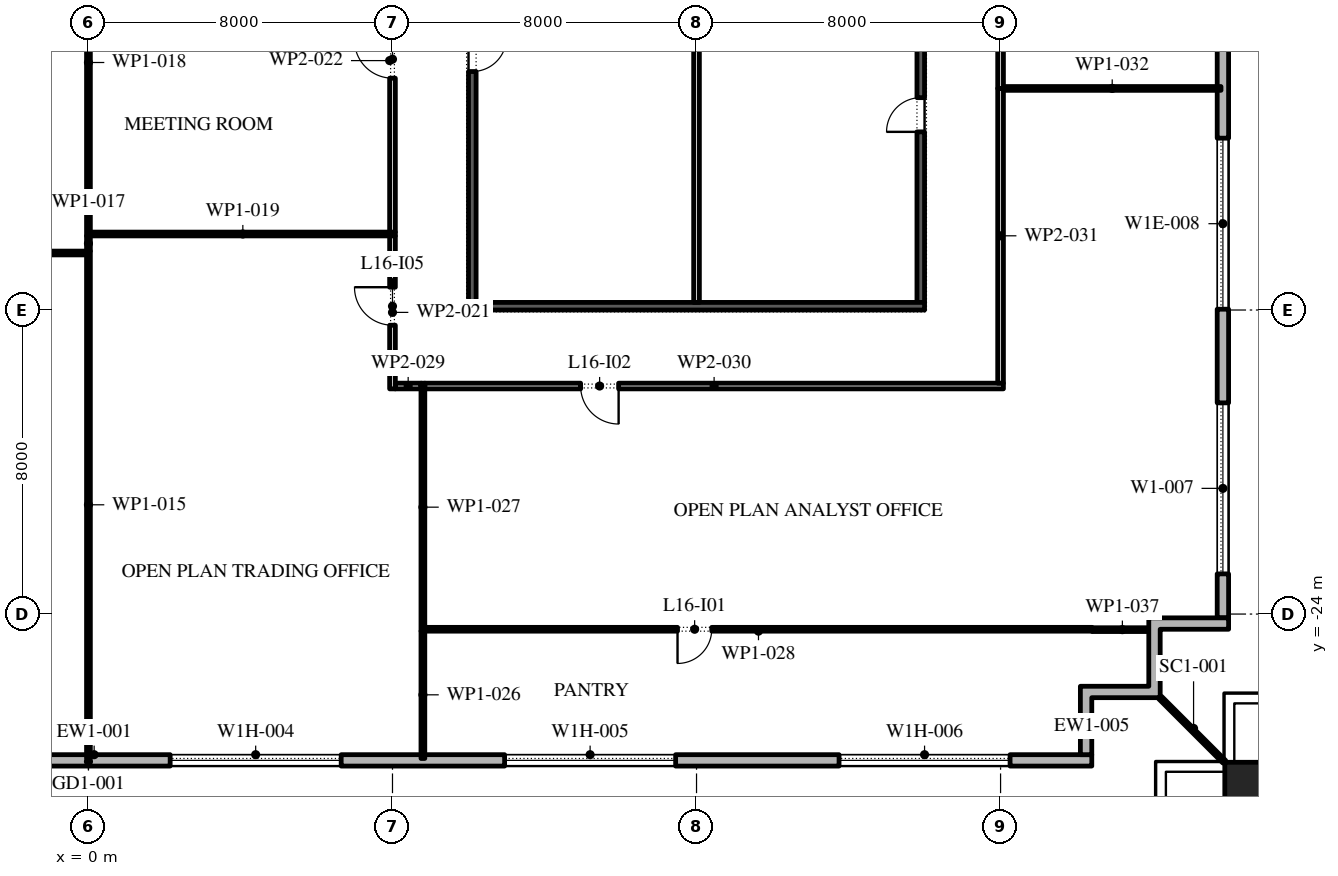
"""IFC4 building model, lengths in metres.
Left out: names, types, materials, properties, quantities, classifications, styles, units other than length and angle.
Written with IfcOpenShell. Run it as: python <this file> out.ifc"""

import sys

from ifc_helpers import new_model, si_unit, direction, frame, frame_2d, origin, origin_2d, place, context, subcontext, project, spatial, polyline, rectangle, outline, extrude, element, fill, save


model = new_model("IFC4")
c1 = context("Model", 3, precision=1e-05, world=origin(), true_north=direction((0.0, 1.0)))
c2 = subcontext(c1, "Body", "Model", "MODEL_VIEW")
j1 = project(units=[si_unit("LENGTHUNIT", "METRE"), si_unit("PLANEANGLEUNIT", "RADIAN")], contexts=[c1])
p1 = place(None, origin())
s1 = spatial("IfcSite", under=j1, at=p1, CompositionType="ELEMENT")
p2 = place(p1, origin())
s2 = spatial("IfcBuilding", under=s1, at=p2, CompositionType="ELEMENT")
p3 = place(p2, frame((0.0, 0.0, 77.4)))
s3 = spatial("IfcBuildingStorey", under=s2, at=p3, CompositionType="ELEMENT", Elevation=77.4)
p4 = place(p3, frame((30.6, -28.6, 0.0), z_axis=(0.0, 0.0, 1.0), x_axis=(1.0, 0.0, 0.0)))
e1 = element("IfcColumn", 1, at=p4, inside=s3, PredefinedType="COLUMN", context=c2, shape_type="SweptSolid", body=[
    extrude(rectangle(XDim=1.4, YDim=1.4, at=origin_2d()), origin(), (0.0, 0.0, 1.0), 4.2),
])
p5 = place(p3, frame((-26.1, -27.85, 0.0), z_axis=(0.0, 0.0, 1.0), x_axis=(1.0, 0.0, 0.0)))
e2 = element("IfcWall", 2, at=p5, inside=s3, PredefinedType="STANDARD", context=c2, shape_type="SweptSolid", body=[
    extrude(rectangle(XDim=52.5, YDim=0.3, at=frame_2d((26.25, 0.0))), origin(), (0.0, 0.0, 1.0), 4.0),
])
p6 = place(p5, frame((2.0, 0.0, 0.45)))
e3 = element("IfcOpeningElement", 3, at=p6, cuts=e2, PredefinedType="OPENING", context=c2, shape_type="SweptSolid", body=[
    extrude(rectangle(XDim=4.5, YDim=2.75, at=frame_2d((2.25, 1.375))), frame((0.0, 0.16, 0.0), z_axis=(0.0, -1.0, 0.0), x_axis=(1.0, 0.0, 0.0)), (0.0, 0.0, 1.0), 0.32),
])
p7 = place(p5, frame((10.65, 0.0, 0.45)))
e4 = element("IfcOpeningElement", 4, at=p7, cuts=e2, PredefinedType="OPENING", context=c2, shape_type="SweptSolid", body=[
    extrude(rectangle(XDim=4.5, YDim=2.75, at=frame_2d((2.25, 1.375))), frame((0.0, 0.16, 0.0), z_axis=(0.0, -1.0, 0.0), x_axis=(1.0, 0.0, 0.0)), (0.0, 0.0, 1.0), 0.32),
])
p8 = place(p5, frame((20.5, 0.0, 0.0)))
e5 = element("IfcOpeningElement", 5, at=p8, cuts=e2, PredefinedType="OPENING", context=c2, shape_type="SweptSolid", body=[
    extrude(rectangle(XDim=2.4, YDim=3.5, at=frame_2d((1.2, 1.75))), frame((0.0, 0.16, 0.0), z_axis=(0.0, -1.0, 0.0), x_axis=(1.0, 0.0, 0.0)), (0.0, 0.0, 1.0), 0.32),
])
p9 = place(p5, frame((28.25, 0.0, 0.45)))
e6 = element("IfcOpeningElement", 6, at=p9, cuts=e2, PredefinedType="OPENING", context=c2, shape_type="SweptSolid", body=[
    extrude(rectangle(XDim=4.5, YDim=2.75, at=frame_2d((2.25, 1.375))), frame((0.0, 0.16, 0.0), z_axis=(0.0, -1.0, 0.0), x_axis=(1.0, 0.0, 0.0)), (0.0, 0.0, 1.0), 0.32),
])
p10 = place(p5, frame((37.05, 0.0, 0.45)))
e7 = element("IfcOpeningElement", 7, at=p10, cuts=e2, PredefinedType="OPENING", context=c2, shape_type="SweptSolid", body=[
    extrude(rectangle(XDim=4.5, YDim=2.75, at=frame_2d((2.25, 1.375))), frame((0.0, 0.16, 0.0), z_axis=(0.0, -1.0, 0.0), x_axis=(1.0, 0.0, 0.0)), (0.0, 0.0, 1.0), 0.32),
])
p11 = place(p5, frame((45.85, 0.0, 0.45)))
e8 = element("IfcOpeningElement", 8, at=p11, cuts=e2, PredefinedType="OPENING", context=c2, shape_type="SweptSolid", body=[
    extrude(rectangle(XDim=4.5, YDim=2.75, at=frame_2d((2.25, 1.375))), frame((0.0, 0.16, 0.0), z_axis=(0.0, -1.0, 0.0), x_axis=(1.0, 0.0, 0.0)), (0.0, 0.0, 1.0), 0.32),
])
p12 = place(p3, frame((29.85, -24.1, 0.0), z_axis=(0.0, 0.0, 1.0), x_axis=(0.0, 1.0, 0.0)))
e9 = element("IfcWall", 9, at=p12, inside=s3, PredefinedType="STANDARD", context=c2, shape_type="SweptSolid", body=[
    extrude(rectangle(XDim=49.5, YDim=0.3, at=frame_2d((24.75, 0.0))), origin(), (0.0, 0.0, 1.0), 4.0),
])
p13 = place(p12, frame((1.157, 0.0, 0.45)))
e10 = element("IfcOpeningElement", 10, at=p13, cuts=e9, PredefinedType="OPENING", context=c2, shape_type="SweptSolid", body=[
    extrude(rectangle(XDim=4.5, YDim=3.05, at=frame_2d((2.25, 1.525))), frame((0.0, 0.16, 0.0), z_axis=(0.0, -1.0, 0.0), x_axis=(1.0, 0.0, 0.0)), (0.0, 0.0, 1.0), 0.32),
])
p14 = place(p12, frame((8.121, 0.0, 0.45)))
e11 = element("IfcOpeningElement", 11, at=p14, cuts=e9, PredefinedType="OPENING", context=c2, shape_type="SweptSolid", body=[
    extrude(rectangle(XDim=4.5, YDim=2.825, at=frame_2d((2.25, 1.413))), frame((0.0, 0.16, 0.0), z_axis=(0.0, -1.0, 0.0), x_axis=(1.0, 0.0, 0.0)), (0.0, 0.0, 1.0), 0.32),
])
p15 = place(p12, frame((16.286, 0.0, 0.0)))
e12 = element("IfcOpeningElement", 12, at=p15, cuts=e9, PredefinedType="OPENING", context=c2, shape_type="SweptSolid", body=[
    extrude(rectangle(XDim=2.4, YDim=3.325, at=frame_2d((1.2, 1.663))), frame((0.0, 0.16, 0.0), z_axis=(0.0, -1.0, 0.0), x_axis=(1.0, 0.0, 0.0)), (0.0, 0.0, 1.0), 0.32),
])
p16 = place(p12, frame((22.35, 0.0, 0.45)))
e13 = element("IfcOpeningElement", 13, at=p16, cuts=e9, PredefinedType="OPENING", context=c2, shape_type="SweptSolid", body=[
    extrude(rectangle(XDim=4.5, YDim=2.875, at=frame_2d((2.25, 1.438))), frame((0.0, 0.16, 0.0), z_axis=(0.0, -1.0, 0.0), x_axis=(1.0, 0.0, 0.0)), (0.0, 0.0, 1.0), 0.32),
])
p17 = place(p12, frame((29.464, 0.0, 0.45)))
e14 = element("IfcOpeningElement", 14, at=p17, cuts=e9, PredefinedType="OPENING", context=c2, shape_type="SweptSolid", body=[
    extrude(rectangle(XDim=4.5, YDim=2.875, at=frame_2d((2.25, 1.438))), frame((0.0, 0.16, 0.0), z_axis=(0.0, -1.0, 0.0), x_axis=(1.0, 0.0, 0.0)), (0.0, 0.0, 1.0), 0.32),
])
p18 = place(p12, frame((36.579, 0.0, 0.45)))
e15 = element("IfcOpeningElement", 15, at=p18, cuts=e9, PredefinedType="OPENING", context=c2, shape_type="SweptSolid", body=[
    extrude(rectangle(XDim=4.5, YDim=3.05, at=frame_2d((2.25, 1.525))), frame((0.0, 0.16, 0.0), z_axis=(0.0, -1.0, 0.0), x_axis=(1.0, 0.0, 0.0)), (0.0, 0.0, 1.0), 0.32),
])
p19 = place(p12, frame((44.743, 0.0, 0.0)))
e16 = element("IfcOpeningElement", 16, at=p19, cuts=e9, PredefinedType="OPENING", context=c2, shape_type="SweptSolid", body=[
    extrude(rectangle(XDim=2.4, YDim=3.325, at=frame_2d((1.2, 1.663))), frame((0.0, 0.16, 0.0), z_axis=(0.0, -1.0, 0.0), x_axis=(1.0, 0.0, 0.0)), (0.0, 0.0, 1.0), 0.32),
])
p20 = place(p3, origin())
e17 = element("IfcWall", 17, at=p20, inside=s3, PredefinedType="STANDARD", context=c2, shape_type="SweptSolid", body=[
    extrude(outline(polyline([(27.9, -25.9), (27.9, -24.1), (30.0, -24.1), (30.0, -24.4), (28.2, -24.4), (28.2, -26.2), (26.4, -26.2), (26.4, -27.7), (26.1, -27.7), (26.1, -25.9), (27.9, -25.9)])), origin(), (0.0, 0.0, 1.0), 4.0),
])
p21 = place(p3, frame((28.2, -26.2, -0.05), z_axis=(0.0, 0.0, 1.0), x_axis=(0.707106781187, -0.707106781187, 0.0)))
e18 = element("IfcWall", 18, at=p21, inside=s3, PredefinedType="STANDARD", context=c2, shape_type="SweptSolid", body=[
    extrude(rectangle(XDim=2.385, YDim=0.1, at=frame_2d((1.192, 0.0))), origin(), (0.0, 0.0, 1.0), 4.05),
])
p22 = place(p3, frame((21.9, -15.8, 0.0), z_axis=(0.0, 0.0, 1.0), x_axis=(0.0, 1.0, 0.0)))
e19 = element("IfcWall", 19, at=p22, inside=s3, PredefinedType="SHEAR", context=c2, shape_type="SweptSolid", body=[
    extrude(rectangle(XDim=13.05, YDim=0.2, at=frame_2d((6.525, 0.0))), origin(), (0.0, 0.0, 1.0), 4.0),
])
p23 = place(p22, frame((4.488, 0.0, 0.0)))
e20 = element("IfcOpeningElement", 20, at=p23, cuts=e19, PredefinedType="OPENING", context=c2, shape_type="SweptSolid", body=[
    extrude(rectangle(XDim=0.9, YDim=2.1, at=frame_2d((0.45, 1.05))), frame((0.0, 0.11, 0.0), z_axis=(0.0, -1.0, 0.0), x_axis=(1.0, 0.0, 0.0)), (0.0, 0.0, 1.0), 0.22),
])
p24 = place(p22, frame((11.038, 0.0, 0.0)))
e21 = element("IfcOpeningElement", 21, at=p24, cuts=e19, PredefinedType="OPENING", context=c2, shape_type="SweptSolid", body=[
    extrude(rectangle(XDim=1.0, YDim=2.1, at=frame_2d((0.5, 1.05))), frame((0.0, 0.11, 0.0), z_axis=(0.0, -1.0, 0.0), x_axis=(1.0, 0.0, 0.0)), (0.0, 0.0, 1.0), 0.22),
])
p25 = place(p3, frame((10.1, -15.8, 0.0), z_axis=(0.0, 0.0, 1.0), x_axis=(0.0, 1.0, 0.0)))
e22 = element("IfcWall", 22, at=p25, inside=s3, PredefinedType="SHEAR", context=c2, shape_type="SweptSolid", body=[
    extrude(rectangle(XDim=13.05, YDim=0.2, at=frame_2d((6.525, 0.0))), origin(), (0.0, 0.0, 1.0), 4.0),
])
p26 = place(p25, frame((6.075, 0.0, 0.0)))
e23 = element("IfcOpeningElement", 23, at=p26, cuts=e22, PredefinedType="OPENING", context=c2, shape_type="SweptSolid", body=[
    extrude(rectangle(XDim=0.9, YDim=2.1, at=frame_2d((0.45, 1.05))), frame((0.0, 0.11, 0.0), z_axis=(0.0, -1.0, 0.0), x_axis=(1.0, 0.0, 0.0)), (0.0, 0.0, 1.0), 0.22),
])
p27 = place(p3, frame((10.0, -15.9, 0.0), z_axis=(0.0, 0.0, 1.0), x_axis=(1.0, 0.0, 0.0)))
e24 = element("IfcWall", 24, at=p27, inside=s3, PredefinedType="SHEAR", context=c2, shape_type="SweptSolid", body=[
    extrude(rectangle(XDim=12.0, YDim=0.2, at=frame_2d((6.0, 0.0))), origin(), (0.0, 0.0, 1.0), 4.0),
])
p28 = place(p3, frame((16.0, -15.8, 0.0), z_axis=(0.0, 0.0, 1.0), x_axis=(0.0, 1.0, 0.0)))
e25 = element("IfcWall", 25, at=p28, inside=s3, PredefinedType="PARTITIONING", context=c2, shape_type="SweptSolid", body=[
    extrude(rectangle(XDim=13.05, YDim=0.15, at=frame_2d((6.525, 0.0))), origin(), (0.0, 0.0, 1.0), 4.0),
])
p29 = place(p28, frame((11.087, 0.0, 0.0)))
e26 = element("IfcOpeningElement", 26, at=p29, cuts=e25, PredefinedType="OPENING", context=c2, shape_type="SweptSolid", body=[
    extrude(rectangle(XDim=0.9, YDim=2.1, at=frame_2d((0.45, 1.05))), frame((0.0, 0.085, 0.0), z_axis=(0.0, -1.0, 0.0), x_axis=(1.0, 0.0, 0.0)), (0.0, 0.0, 1.0), 0.17),
])
p30 = place(p3, frame((0.0, -27.8, 0.0), z_axis=(0.0, 0.0, 1.0), x_axis=(0.0, 1.0, 0.0)))
e27 = element("IfcWall", 27, at=p30, inside=s3, PredefinedType="PARTITIONING", context=c2, shape_type="SweptSolid", body=[
    extrude(rectangle(XDim=13.35, YDim=0.1, at=frame_2d((6.675, 0.0))), origin(), (0.0, 0.0, 1.0), 4.0),
])
p31 = place(p3, frame((-0.05, -14.5, 0.0), z_axis=(0.0, 0.0, 1.0), x_axis=(-1.0, 0.0, 0.0)))
e28 = element("IfcWall", 28, at=p31, inside=s3, PredefinedType="PARTITIONING", context=c2, shape_type="SweptSolid", body=[
    extrude(rectangle(XDim=7.875, YDim=0.1, at=frame_2d((3.938, 0.0))), origin(), (0.0, 0.0, 1.0), 4.0),
])
p32 = place(p3, frame((0.0, -14.45, 0.0), z_axis=(0.0, 0.0, 1.0), x_axis=(0.0, 1.0, 0.0)))
e29 = element("IfcWall", 29, at=p32, inside=s3, PredefinedType="PARTITIONING", context=c2, shape_type="SweptSolid", body=[
    extrude(rectangle(XDim=0.4, YDim=0.1, at=frame_2d((0.2, 0.0))), origin(), (0.0, 0.0, 1.0), 4.0),
])
p33 = place(p3, frame((0.0, -14.05, 0.0), z_axis=(0.0, 0.0, 1.0), x_axis=(0.0, 1.0, 0.0)))
e30 = element("IfcWall", 30, at=p33, inside=s3, PredefinedType="PARTITIONING", context=c2, shape_type="SweptSolid", body=[
    extrude(rectangle(XDim=9.125, YDim=0.1, at=frame_2d((4.562, 0.0))), origin(), (0.0, 0.0, 1.0), 4.0),
])
p34 = place(p3, frame((0.05, -14.0, 0.0), z_axis=(0.0, 0.0, 1.0), x_axis=(1.0, 0.0, 0.0)))
e31 = element("IfcWall", 31, at=p34, inside=s3, PredefinedType="PARTITIONING", context=c2, shape_type="SweptSolid", body=[
    extrude(rectangle(XDim=8.025, YDim=0.1, at=frame_2d((4.012, 0.0))), origin(), (0.0, 0.0, 1.0), 4.0),
])
p35 = place(p3, frame((8.0, -18.075, 0.0), z_axis=(0.0, 0.0, 1.0), x_axis=(0.0, 1.0, 0.0)))
e32 = element("IfcWall", 32, at=p35, inside=s3, PredefinedType="PARTITIONING", context=c2, shape_type="SweptSolid", body=[
    extrude(rectangle(XDim=4.025, YDim=0.15, at=frame_2d((2.012, 0.0))), origin(), (0.0, 0.0, 1.0), 4.0),
])
p36 = place(p35, frame((1.675, 0.0, 0.0)))
e33 = element("IfcOpeningElement", 33, at=p36, cuts=e32, PredefinedType="OPENING", context=c2, shape_type="SweptSolid", body=[
    extrude(rectangle(XDim=1.0, YDim=2.1, at=frame_2d((0.5, 1.05))), frame((0.0, 0.085, 0.0), z_axis=(0.0, -1.0, 0.0), x_axis=(1.0, 0.0, 0.0)), (0.0, 0.0, 1.0), 0.17),
])
p37 = place(p3, frame((8.0, -13.95, 0.0), z_axis=(0.0, 0.0, 1.0), x_axis=(0.0, 1.0, 0.0)))
e34 = element("IfcWall", 34, at=p37, inside=s3, PredefinedType="PARTITIONING", context=c2, shape_type="SweptSolid", body=[
    extrude(rectangle(XDim=9.025, YDim=0.15, at=frame_2d((4.512, 0.0))), origin(), (0.0, 0.0, 1.0), 4.0),
])
p38 = place(p37, frame((4.05, 0.0, 0.0)))
e35 = element("IfcOpeningElement", 35, at=p38, cuts=e34, PredefinedType="OPENING", context=c2, shape_type="SweptSolid", body=[
    extrude(rectangle(XDim=1.0, YDim=2.1, at=frame_2d((0.5, 1.05))), frame((0.0, 0.085, 0.0), z_axis=(0.0, -1.0, 0.0), x_axis=(1.0, 0.0, 0.0)), (0.0, 0.0, 1.0), 0.17),
])
p39 = place(p3, frame((8.8, -27.8, 0.0), z_axis=(0.0, 0.0, 1.0), x_axis=(0.0, 1.0, 0.0)))
e36 = element("IfcWall", 36, at=p39, inside=s3, PredefinedType="PARTITIONING", context=c2, shape_type="SweptSolid", body=[
    extrude(rectangle(XDim=3.35, YDim=0.1, at=frame_2d((1.675, 0.0))), origin(), (0.0, 0.0, 1.0), 4.0),
])
p40 = place(p3, frame((8.8, -24.45, 0.0), z_axis=(0.0, 0.0, 1.0), x_axis=(0.0, 1.0, 0.0)))
e37 = element("IfcWall", 37, at=p40, inside=s3, PredefinedType="PARTITIONING", context=c2, shape_type="SweptSolid", body=[
    extrude(rectangle(XDim=6.525, YDim=0.1, at=frame_2d((3.262, 0.0))), origin(), (0.0, 0.0, 1.0), 4.0),
])
p41 = place(p3, frame((8.85, -24.4, 0.0), z_axis=(0.0, 0.0, 1.0), x_axis=(1.0, 0.0, 0.0)))
e38 = element("IfcWall", 38, at=p41, inside=s3, PredefinedType="PARTITIONING", context=c2, shape_type="SweptSolid", body=[
    extrude(rectangle(XDim=17.56, YDim=0.1, at=frame_2d((8.78, 0.0))), origin(), (0.0, 0.0, 1.0), 4.0),
])
p42 = place(p41, frame((6.65, 0.0, 0.0)))
e39 = element("IfcOpeningElement", 39, at=p42, cuts=e38, PredefinedType="OPENING", context=c2, shape_type="SweptSolid", body=[
    extrude(rectangle(XDim=0.9, YDim=2.1, at=frame_2d((0.45, 1.05))), frame((0.0, 0.06, 0.0), z_axis=(0.0, -1.0, 0.0), x_axis=(1.0, 0.0, 0.0)), (0.0, 0.0, 1.0), 0.12),
])
p43 = place(p3, frame((8.75, -18.0, 0.0), z_axis=(0.0, 0.0, 1.0), x_axis=(-1.0, 0.0, 0.0)))
e40 = element("IfcWall", 40, at=p43, inside=s3, PredefinedType="PARTITIONING", context=c2, shape_type="SweptSolid", body=[
    extrude(rectangle(XDim=0.675, YDim=0.15, at=frame_2d((0.337, 0.0))), origin(), (0.0, 0.0, 1.0), 4.0),
])
p44 = place(p3, frame((24.075, -18.0, 0.0), z_axis=(0.0, 0.0, 1.0), x_axis=(-1.0, 0.0, 0.0)))
e41 = element("IfcWall", 41, at=p44, inside=s3, PredefinedType="PARTITIONING", context=c2, shape_type="SweptSolid", body=[
    extrude(rectangle(XDim=15.225, YDim=0.15, at=frame_2d((7.612, 0.0))), origin(), (0.0, 0.0, 1.0), 4.0),
])
p45 = place(p44, frame((10.125, 0.0, 0.0)))
e42 = element("IfcOpeningElement", 42, at=p45, cuts=e41, PredefinedType="OPENING", context=c2, shape_type="SweptSolid", body=[
    extrude(rectangle(XDim=1.0, YDim=2.1, at=frame_2d((0.5, 1.05))), frame((0.0, 0.085, 0.0), z_axis=(0.0, -1.0, 0.0), x_axis=(1.0, 0.0, 0.0)), (0.0, 0.0, 1.0), 0.17),
])
p46 = place(p3, frame((24.0, -10.17, 0.0), z_axis=(0.0, 0.0, 1.0), x_axis=(0.0, -1.0, 0.0)))
e43 = element("IfcWall", 43, at=p46, inside=s3, PredefinedType="PARTITIONING", context=c2, shape_type="SweptSolid", body=[
    extrude(rectangle(XDim=7.755, YDim=0.15, at=frame_2d((3.877, 0.0))), origin(), (0.0, 0.0, 1.0), 4.0),
])
p47 = place(p3, frame((24.075, -10.17, 0.0), z_axis=(0.0, 0.0, 1.0), x_axis=(1.0, 0.0, 0.0)))
e44 = element("IfcWall", 44, at=p47, inside=s3, PredefinedType="PARTITIONING", context=c2, shape_type="SweptSolid", body=[
    extrude(rectangle(XDim=5.725, YDim=0.1, at=frame_2d((2.863, 0.0))), origin(), (0.0, 0.0, 1.0), 4.0),
])
p48 = place(p3, frame((24.0, 11.22, 0.0), z_axis=(0.0, 0.0, 1.0), x_axis=(0.0, -1.0, 0.0)))
e45 = element("IfcWall", 45, at=p48, inside=s3, PredefinedType="PARTITIONING", context=c2, shape_type="SweptSolid", body=[
    extrude(rectangle(XDim=21.39, YDim=0.15, at=frame_2d((10.695, 0.0))), origin(), (0.0, 0.0, 1.0), 4.0),
])
p49 = place(p48, frame((14.49, 0.0, 0.0)))
e46 = element("IfcOpeningElement", 46, at=p49, cuts=e45, PredefinedType="OPENING", context=c2, shape_type="SweptSolid", body=[
    extrude(rectangle(XDim=1.0, YDim=2.1, at=frame_2d((0.5, 1.05))), frame((0.0, 0.085, 0.0), z_axis=(0.0, -1.0, 0.0), x_axis=(1.0, 0.0, 0.0)), (0.0, 0.0, 1.0), 0.17),
])
p50 = place(p3, frame((26.41, -24.41, 0.0), z_axis=(0.0, 0.0, 1.0), x_axis=(1.0, 0.0, 0.0)))
e47 = element("IfcWall", 47, at=p50, inside=s3, PredefinedType="PARTITIONING", context=c2, shape_type="SweptSolid", body=[
    extrude(rectangle(XDim=1.59, YDim=0.1, at=frame_2d((0.795, 0.0))), origin(), (0.0, 0.0, 1.0), 4.0),
])
p51 = place(p9, origin())
e48 = element("IfcWindow", 48, at=p51, inside=s3, PartitioningType="DOUBLE_PANEL_VERTICAL", PredefinedType="WINDOW", context=c2, shape_type="SweptSolid", body=[
    extrude(rectangle(XDim=4.5, YDim=2.75, at=frame_2d((2.25, 1.375))), frame((0.0, 0.03, 0.0), z_axis=(0.0, -1.0, 0.0), x_axis=(1.0, 0.0, 0.0)), (0.0, 0.0, 1.0), 0.06),
])
fill(e6, e48)
p52 = place(p10, origin())
e49 = element("IfcWindow", 49, at=p52, inside=s3, PartitioningType="DOUBLE_PANEL_VERTICAL", PredefinedType="WINDOW", context=c2, shape_type="SweptSolid", body=[
    extrude(rectangle(XDim=4.5, YDim=2.75, at=frame_2d((2.25, 1.375))), frame((0.0, 0.03, 0.0), z_axis=(0.0, -1.0, 0.0), x_axis=(1.0, 0.0, 0.0)), (0.0, 0.0, 1.0), 0.06),
])
fill(e7, e49)
p53 = place(p11, origin())
e50 = element("IfcWindow", 50, at=p53, inside=s3, PartitioningType="DOUBLE_PANEL_VERTICAL", PredefinedType="WINDOW", context=c2, shape_type="SweptSolid", body=[
    extrude(rectangle(XDim=4.5, YDim=2.75, at=frame_2d((2.25, 1.375))), frame((0.0, 0.03, 0.0), z_axis=(0.0, -1.0, 0.0), x_axis=(1.0, 0.0, 0.0)), (0.0, 0.0, 1.0), 0.06),
])
fill(e8, e50)
p54 = place(p13, origin())
e51 = element("IfcWindow", 51, at=p54, inside=s3, PartitioningType="DOUBLE_PANEL_VERTICAL", PredefinedType="WINDOW", context=c2, shape_type="SweptSolid", body=[
    extrude(rectangle(XDim=4.5, YDim=3.05, at=frame_2d((2.25, 1.525))), frame((0.0, 0.03, 0.0), z_axis=(0.0, -1.0, 0.0), x_axis=(1.0, 0.0, 0.0)), (0.0, 0.0, 1.0), 0.06),
])
fill(e10, e51)
p55 = place(p14, origin())
e52 = element("IfcWindow", 52, at=p55, inside=s3, PartitioningType="DOUBLE_PANEL_VERTICAL", PredefinedType="WINDOW", context=c2, shape_type="SweptSolid", body=[
    extrude(rectangle(XDim=4.5, YDim=2.825, at=frame_2d((2.25, 1.413))), frame((0.0, 0.03, 0.0), z_axis=(0.0, -1.0, 0.0), x_axis=(1.0, 0.0, 0.0)), (0.0, 0.0, 1.0), 0.06),
])
fill(e11, e52)
p56 = place(p23, origin())
e53 = element("IfcDoor", 53, at=p56, inside=s3, OperationType="SINGLE_SWING_RIGHT", PredefinedType="DOOR", context=c2, shape_type="SweptSolid", body=[
    extrude(rectangle(XDim=0.9, YDim=2.1, at=frame_2d((0.45, 1.05))), frame((0.0, 0.1, 0.0), z_axis=(0.0, -1.0, 0.0), x_axis=(1.0, 0.0, 0.0)), (0.0, 0.0, 1.0), 0.05),
])
fill(e20, e53)
p57 = place(p26, frame((0.9, -0.15, 0.0), z_axis=(0.0, 0.0, 1.0), x_axis=(-1.0, 0.0, 0.0)))
e54 = element("IfcDoor", 54, at=p57, inside=s3, OperationType="SINGLE_SWING_RIGHT", PredefinedType="DOOR", context=c2, shape_type="SweptSolid", body=[
    extrude(rectangle(XDim=0.9, YDim=2.1, at=frame_2d((0.45, 1.05))), frame((0.0, -0.05, 0.0), z_axis=(0.0, -1.0, 0.0), x_axis=(1.0, 0.0, 0.0)), (0.0, 0.0, 1.0), 0.05),
])
fill(e23, e54)
p58 = place(p42, frame((0.9, 0.0, 0.0), z_axis=(0.0, 0.0, 1.0), x_axis=(-1.0, 0.0, 0.0)))
e55 = element("IfcDoor", 55, at=p58, inside=s3, OperationType="SINGLE_SWING_LEFT", PredefinedType="DOOR", context=c2, shape_type="SweptSolid", body=[
    extrude(rectangle(XDim=0.9, YDim=2.1, at=frame_2d((0.45, 1.05))), frame((0.0, 0.025, 0.0), z_axis=(0.0, -1.0, 0.0), x_axis=(1.0, 0.0, 0.0)), (0.0, 0.0, 1.0), 0.05),
])
fill(e39, e55)
p59 = place(p45, origin())
e56 = element("IfcDoor", 56, at=p59, inside=s3, OperationType="SINGLE_SWING_RIGHT", PredefinedType="DOOR", context=c2, shape_type="SweptSolid", body=[
    extrude(rectangle(XDim=1.0, YDim=2.1, at=frame_2d((0.5, 1.05))), frame((0.0, 0.025, 0.0), z_axis=(0.0, -1.0, 0.0), x_axis=(1.0, 0.0, 0.0)), (0.0, 0.0, 1.0), 0.05),
])
fill(e42, e56)
p60 = place(p36, origin())
e57 = element("IfcDoor", 57, at=p60, inside=s3, OperationType="SINGLE_SWING_LEFT", PredefinedType="DOOR", context=c2, shape_type="SweptSolid", body=[
    extrude(rectangle(XDim=1.0, YDim=2.1, at=frame_2d((0.5, 1.05))), frame((0.0, 0.025, 0.0), z_axis=(0.0, -1.0, 0.0), x_axis=(1.0, 0.0, 0.0)), (0.0, 0.0, 1.0), 0.05),
])
fill(e33, e57)
p61 = place(p38, origin())
e58 = element("IfcDoor", 58, at=p61, inside=s3, OperationType="SINGLE_SWING_LEFT", PredefinedType="DOOR", context=c2, shape_type="SweptSolid", body=[
    extrude(rectangle(XDim=1.0, YDim=2.1, at=frame_2d((0.5, 1.05))), frame((0.0, 0.025, 0.0), z_axis=(0.0, -1.0, 0.0), x_axis=(1.0, 0.0, 0.0)), (0.0, 0.0, 1.0), 0.05),
])
fill(e35, e58)
save(model, sys.argv[1])
